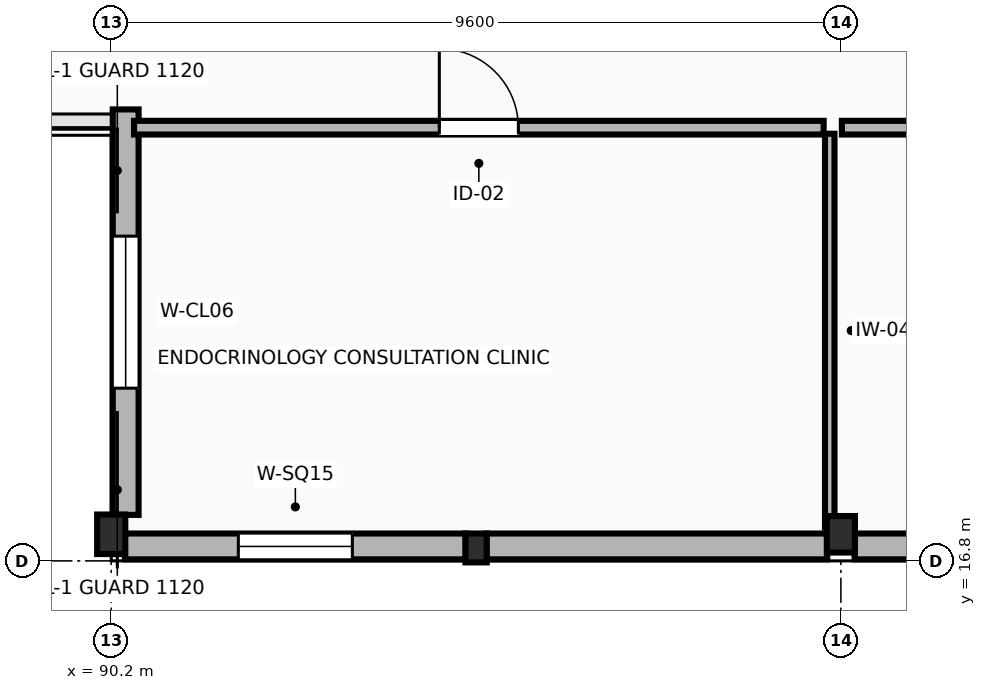
"""IFC4 building model, lengths in metres.
Left out: names, types, materials, properties, quantities, classifications, styles, units other than length and angle.
Written with IfcOpenShell. Run it as: python <this file> out.ifc"""

import sys

from ifc_helpers import new_model, si_unit, direction, frame, frame_2d, origin, origin_2d, place, context, subcontext, project, spatial, rectangle, extrude, element, fill, save


model = new_model("IFC4")
c1 = context("Model", 3, precision=1e-05, world=origin(), true_north=direction((0.0, 1.0)))
c2 = subcontext(c1, "Body", "Model", "MODEL_VIEW")
j1 = project(units=[si_unit("LENGTHUNIT", "METRE"), si_unit("PLANEANGLEUNIT", "RADIAN")], contexts=[c1])
p1 = place(None, origin())
s1 = spatial("IfcSite", under=j1, at=p1, CompositionType="ELEMENT")
p2 = place(p1, origin())
s2 = spatial("IfcBuilding", under=s1, at=p2, CompositionType="ELEMENT")
p3 = place(p2, frame((0.0, 0.0, 13.8)))
s3 = spatial("IfcBuildingStorey", under=s2, at=p3, CompositionType="ELEMENT", Elevation=13.8)
p4 = place(p3, frame((90.2, 17.15, 0.0), z_axis=(0.0, 0.0, 1.0), x_axis=(1.0, 0.0, 0.0)))
e1 = element("IfcColumn", 1, at=p4, inside=s3, PredefinedType="COLUMN", context=c2, shape_type="SweptSolid", body=[
    extrude(rectangle(XDim=0.37, YDim=0.52, at=origin_2d()), origin(), (0.0, 0.0, 1.0), 4.2),
])
p5 = place(p3, frame((99.8, 17.15, 0.0), z_axis=(0.0, 0.0, 1.0), x_axis=(1.0, 0.0, 0.0)))
e2 = element("IfcColumn", 2, at=p5, inside=s3, PredefinedType="COLUMN", context=c2, shape_type="SweptSolid", body=[
    extrude(rectangle(XDim=0.37, YDim=0.48, at=origin_2d()), origin(), (0.0, 0.0, 1.0), 4.2),
])
p6 = place(p3, frame((95.0, 16.97, 0.0), z_axis=(0.0, 0.0, 1.0), x_axis=(1.0, 0.0, 0.0)))
e3 = element("IfcColumn", 3, at=p6, inside=s3, PredefinedType="PILASTER", context=c2, shape_type="SweptSolid", body=[
    extrude(rectangle(XDim=0.28, YDim=0.38, at=origin_2d()), origin(), (0.0, 0.0, 1.0), 4.2),
])
p7 = place(p3, frame((90.39, 22.74, 0.0), z_axis=(0.0, 0.0, 1.0), x_axis=(0.0, -1.0, 0.0)))
e4 = element("IfcWall", 4, at=p7, inside=s3, PredefinedType="STANDARD", context=c2, shape_type="SweptSolid", body=[
    extrude(rectangle(XDim=5.335, YDim=0.34, at=frame_2d((2.667, 0.0))), origin(), (0.0, 0.0, 1.0), 3.335),
])
p8 = place(p7, frame((1.667, 0.0, 0.95)))
e5 = element("IfcOpeningElement", 5, at=p8, cuts=e4, PredefinedType="OPENING", context=c2, shape_type="SweptSolid", body=[
    extrude(rectangle(XDim=2.0, YDim=1.6, at=frame_2d((1.0, 0.8))), frame((0.0, 0.18, 0.0), z_axis=(0.0, -1.0, 0.0), x_axis=(1.0, 0.0, 0.0)), (0.0, 0.0, 1.0), 0.36),
])
p9 = place(p3, frame((90.38, 16.99, 0.0), z_axis=(0.0, 0.0, 1.0), x_axis=(1.0, 0.0, 0.0)))
e6 = element("IfcWall", 6, at=p9, inside=s3, PredefinedType="STANDARD", context=c2, shape_type="SweptSolid", body=[
    extrude(rectangle(XDim=4.485, YDim=0.34, at=frame_2d((2.243, 0.0))), origin(), (0.0, 0.0, 1.0), 3.185),
])
p10 = place(p9, frame((1.492, 0.0, 1.35)))
e7 = element("IfcOpeningElement", 7, at=p10, cuts=e6, PredefinedType="OPENING", context=c2, shape_type="SweptSolid", body=[
    extrude(rectangle(XDim=1.5, YDim=1.5, at=frame_2d((0.75, 0.75))), frame((0.0, 0.18, 0.0), z_axis=(0.0, -1.0, 0.0), x_axis=(1.0, 0.0, 0.0)), (0.0, 0.0, 1.0), 0.36),
])
p11 = place(p3, frame((95.135, 16.99, 0.0), z_axis=(0.0, 0.0, 1.0), x_axis=(1.0, 0.0, 0.0)))
e8 = element("IfcWall", 8, at=p11, inside=s3, PredefinedType="STANDARD", context=c2, shape_type="SweptSolid", body=[
    extrude(rectangle(XDim=4.485, YDim=0.34, at=frame_2d((2.243, 0.0))), origin(), (0.0, 0.0, 1.0), 3.185),
])
p12 = place(p3, frame((99.98, 16.99, 0.0), z_axis=(0.0, 0.0, 1.0), x_axis=(1.0, 0.0, 0.0)))
e9 = element("IfcWall", 9, at=p12, inside=s3, PredefinedType="STANDARD", context=c2, shape_type="SweptSolid", body=[
    extrude(rectangle(XDim=4.5, YDim=0.34, at=frame_2d((2.25, 0.0))), origin(), (0.0, 0.0, 1.0), 3.185),
])
p13 = place(p12, frame((1.8, 0.0, 0.95)))
e10 = element("IfcOpeningElement", 10, at=p13, cuts=e9, PredefinedType="OPENING", context=c2, shape_type="SweptSolid", body=[
    extrude(rectangle(XDim=0.9, YDim=0.9, at=frame_2d((0.45, 0.45))), frame((0.0, 0.18, 0.0), z_axis=(0.0, -1.0, 0.0), x_axis=(1.0, 0.0, 0.0)), (0.0, 0.0, 1.0), 0.36),
])
p14 = place(p3, frame((90.5, 22.5, 0.0), z_axis=(0.0, 0.0, 1.0), x_axis=(1.0, 0.0, 0.0)))
e11 = element("IfcWall", 11, at=p14, inside=s3, PredefinedType="PARTITIONING", context=c2, shape_type="SweptSolid", body=[
    extrude(rectangle(XDim=9.073, YDim=0.18, at=frame_2d((4.537, 0.0))), origin(), (0.0, 0.0, 1.0), 3.92),
])
p15 = place(p14, frame((4.017, 0.0, 0.0)))
e12 = element("IfcOpeningElement", 12, at=p15, cuts=e11, PredefinedType="OPENING", context=c2, shape_type="SweptSolid", body=[
    extrude(rectangle(XDim=1.04, YDim=2.15, at=frame_2d((0.52, 1.075))), frame((0.0, 0.1, 0.0), z_axis=(0.0, -1.0, 0.0), x_axis=(1.0, 0.0, 0.0)), (0.0, 0.0, 1.0), 0.2),
])
p16 = place(p3, frame((99.653, 22.42, 0.0), z_axis=(0.0, 0.0, 1.0), x_axis=(0.0, -1.0, 0.0)))
e13 = element("IfcWall", 13, at=p16, inside=s3, PredefinedType="PARTITIONING", context=c2, shape_type="SweptSolid", body=[
    extrude(rectangle(XDim=5.18, YDim=0.125, at=frame_2d((2.59, 0.0))), origin(), (0.0, 0.0, 1.0), 2.965),
])
p17 = place(p3, frame((99.813, 22.5, 0.0), z_axis=(0.0, 0.0, 1.0), x_axis=(1.0, 0.0, 0.0)))
e14 = element("IfcWall", 14, at=p17, inside=s3, PredefinedType="PARTITIONING", context=c2, shape_type="SweptSolid", body=[
    extrude(rectangle(XDim=9.033, YDim=0.18, at=frame_2d((4.517, 0.0))), origin(), (0.0, 0.0, 1.0), 3.92),
])
p18 = place(p17, frame((4.037, 0.0, 0.0)))
e15 = element("IfcOpeningElement", 15, at=p18, cuts=e14, PredefinedType="OPENING", context=c2, shape_type="SweptSolid", body=[
    extrude(rectangle(XDim=0.96, YDim=2.1, at=frame_2d((0.48, 1.05))), frame((0.0, 0.1, 0.0), z_axis=(0.0, -1.0, 0.0), x_axis=(1.0, 0.0, 0.0)), (0.0, 0.0, 1.0), 0.2),
])
p19 = place(p8, origin())
e16 = element("IfcWindow", 16, at=p19, inside=s3, PartitioningType="SINGLE_PANEL", PredefinedType="WINDOW", context=c2, shape_type="SweptSolid", body=[
    extrude(rectangle(XDim=2.0, YDim=1.6, at=frame_2d((1.0, 0.8))), frame((0.0, 0.03, 0.0), z_axis=(0.0, -1.0, 0.0), x_axis=(1.0, 0.0, 0.0)), (0.0, 0.0, 1.0), 0.06),
])
fill(e5, e16)
p20 = place(p10, origin())
e17 = element("IfcWindow", 17, at=p20, inside=s3, PartitioningType="SINGLE_PANEL", PredefinedType="WINDOW", context=c2, shape_type="SweptSolid", body=[
    extrude(rectangle(XDim=1.5, YDim=1.5, at=frame_2d((0.75, 0.75))), frame((0.0, 0.03, 0.0), z_axis=(0.0, -1.0, 0.0), x_axis=(1.0, 0.0, 0.0)), (0.0, 0.0, 1.0), 0.06),
])
fill(e7, e17)
p21 = place(p15, origin())
e18 = element("IfcDoor", 18, at=p21, inside=s3, OperationType="SINGLE_SWING_LEFT", PredefinedType="DOOR", context=c2, shape_type="SweptSolid", body=[
    extrude(rectangle(XDim=1.04, YDim=2.15, at=frame_2d((0.52, 1.075))), frame((0.0, 0.025, 0.0), z_axis=(0.0, -1.0, 0.0), x_axis=(1.0, 0.0, 0.0)), (0.0, 0.0, 1.0), 0.05),
])
fill(e12, e18)
save(model, sys.argv[1])
